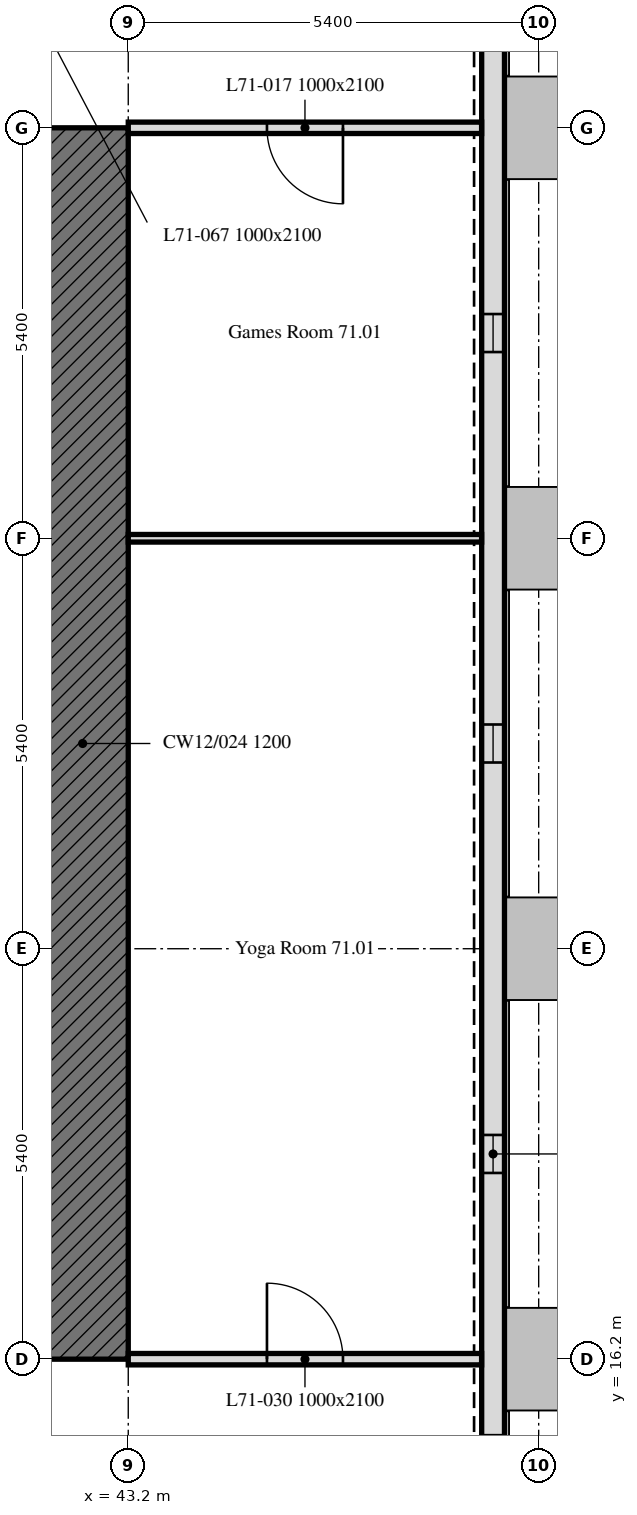
"""IFC4 building model, lengths in metres.
Left out: names, types, materials, properties, quantities, classifications, styles, units other than length and angle.
Written with IfcOpenShell. Run it as: python <this file> out.ifc"""

import sys

from ifc_helpers import new_model, si_unit, direction, frame, frame_2d, origin, place, context, subcontext, project, spatial, rectangle, extrude, element, fill, save


model = new_model("IFC4")
c1 = context("Model", 3, precision=1e-05, world=origin(), true_north=direction((0.0, 1.0)))
c2 = subcontext(c1, "Body", "Model", "MODEL_VIEW")
j1 = project(units=[si_unit("LENGTHUNIT", "METRE"), si_unit("PLANEANGLEUNIT", "RADIAN")], contexts=[c1])
p1 = place(None, origin())
s1 = spatial("IfcSite", under=j1, at=p1, CompositionType="ELEMENT")
p2 = place(p1, origin())
s2 = spatial("IfcBuilding", under=s1, at=p2, CompositionType="ELEMENT")
p3 = place(p2, frame((0.0, 0.0, 288.4)))
s3 = spatial("IfcBuildingStorey", under=s2, at=p3, CompositionType="ELEMENT", Elevation=288.4)
p4 = place(p3, frame((48.0, 10.986, 0.0), z_axis=(0.0, 0.0, 1.0), x_axis=(0.0, 1.0, 0.0)))
e1 = element("IfcWall", 1, at=p4, inside=s3, PredefinedType="SOLIDWALL", context=c2, shape_type="SweptSolid", body=[
    extrude(rectangle(XDim=32.027, YDim=0.3, at=frame_2d((16.014, 0.0))), origin(), (0.0, 0.0, 1.0), 3.0),
])
p5 = place(p4, frame((1.164, 0.0, 0.9)))
e2 = element("IfcOpeningElement", 2, at=p5, cuts=e1, PredefinedType="OPENING", context=c2, shape_type="SweptSolid", body=[
    extrude(rectangle(XDim=1.1, YDim=1.7, at=frame_2d((0.55, 0.85))), frame((0.0, 0.16, 0.0), z_axis=(0.0, -1.0, 0.0), x_axis=(1.0, 0.0, 0.0)), (0.0, 0.0, 1.0), 0.32),
])
p6 = place(p4, frame((3.114, 0.0, 0.9)))
e3 = element("IfcOpeningElement", 3, at=p6, cuts=e1, PredefinedType="OPENING", context=c2, shape_type="SweptSolid", body=[
    extrude(rectangle(XDim=1.1, YDim=1.7, at=frame_2d((0.55, 0.85))), frame((0.0, 0.16, 0.0), z_axis=(0.0, -1.0, 0.0), x_axis=(1.0, 0.0, 0.0)), (0.0, 0.0, 1.0), 0.32),
])
p7 = place(p4, frame((7.664, 0.0, 0.9)))
e4 = element("IfcOpeningElement", 4, at=p7, cuts=e1, PredefinedType="OPENING", context=c2, shape_type="SweptSolid", body=[
    extrude(rectangle(XDim=0.5, YDim=1.7, at=frame_2d((0.25, 0.85))), frame((0.0, 0.16, 0.0), z_axis=(0.0, -1.0, 0.0), x_axis=(1.0, 0.0, 0.0)), (0.0, 0.0, 1.0), 0.32),
])
p8 = place(p4, frame((13.064, 0.0, 0.9)))
e5 = element("IfcOpeningElement", 5, at=p8, cuts=e1, PredefinedType="OPENING", context=c2, shape_type="SweptSolid", body=[
    extrude(rectangle(XDim=0.5, YDim=1.7, at=frame_2d((0.25, 0.85))), frame((0.0, 0.16, 0.0), z_axis=(0.0, -1.0, 0.0), x_axis=(1.0, 0.0, 0.0)), (0.0, 0.0, 1.0), 0.32),
])
p9 = place(p4, frame((18.464, 0.0, 0.9)))
e6 = element("IfcOpeningElement", 6, at=p9, cuts=e1, PredefinedType="OPENING", context=c2, shape_type="SweptSolid", body=[
    extrude(rectangle(XDim=0.5, YDim=1.7, at=frame_2d((0.25, 0.85))), frame((0.0, 0.16, 0.0), z_axis=(0.0, -1.0, 0.0), x_axis=(1.0, 0.0, 0.0)), (0.0, 0.0, 1.0), 0.32),
])
p10 = place(p4, frame((23.864, 0.0, 0.9)))
e7 = element("IfcOpeningElement", 7, at=p10, cuts=e1, PredefinedType="OPENING", context=c2, shape_type="SweptSolid", body=[
    extrude(rectangle(XDim=0.5, YDim=1.7, at=frame_2d((0.25, 0.85))), frame((0.0, 0.16, 0.0), z_axis=(0.0, -1.0, 0.0), x_axis=(1.0, 0.0, 0.0)), (0.0, 0.0, 1.0), 0.32),
])
p11 = place(p4, frame((28.164, 0.0, 0.9)))
e8 = element("IfcOpeningElement", 8, at=p11, cuts=e1, PredefinedType="OPENING", context=c2, shape_type="SweptSolid", body=[
    extrude(rectangle(XDim=1.1, YDim=1.7, at=frame_2d((0.55, 0.85))), frame((0.0, 0.16, 0.0), z_axis=(0.0, -1.0, 0.0), x_axis=(1.0, 0.0, 0.0)), (0.0, 0.0, 1.0), 0.32),
])
p12 = place(p4, frame((29.589, 0.0, 0.9)))
e9 = element("IfcOpeningElement", 9, at=p12, cuts=e1, PredefinedType="OPENING", context=c2, shape_type="SweptSolid", body=[
    extrude(rectangle(XDim=0.65, YDim=1.7, at=frame_2d((0.325, 0.85))), frame((0.0, 0.16, 0.0), z_axis=(0.0, -1.0, 0.0), x_axis=(1.0, 0.0, 0.0)), (0.0, 0.0, 1.0), 0.32),
])
p13 = place(p3, frame((42.6, 32.4, 0.0), z_axis=(0.0, 0.0, 1.0), x_axis=(0.0, -1.0, 0.0)))
e10 = element("IfcWall", 10, at=p13, inside=s3, PredefinedType="SOLIDWALL", context=c2, shape_type="SweptSolid", body=[
    extrude(rectangle(XDim=16.2, YDim=1.2, at=frame_2d((8.1, 0.0))), origin(), (0.0, 0.0, 1.0), 3.0),
])
p14 = place(p3, frame((43.2, 27.0, 0.0), z_axis=(0.0, 0.0, 1.0), x_axis=(1.0, 0.0, 0.0)))
e11 = element("IfcWall", 11, at=p14, inside=s3, PredefinedType="PARTITIONING", context=c2, shape_type="SweptSolid", body=[
    extrude(rectangle(XDim=4.649, YDim=0.1, at=frame_2d((2.325, 0.0))), origin(), (0.0, 0.0, 1.0), 2.4),
])
p15 = place(p3, frame((47.849, 32.4, 0.0), z_axis=(0.0, 0.0, 1.0), x_axis=(-1.0, 0.0, 0.0)))
e12 = element("IfcWall", 12, at=p15, inside=s3, PredefinedType="PARTITIONING", context=c2, shape_type="SweptSolid", body=[
    extrude(rectangle(XDim=4.649, YDim=0.15, at=frame_2d((2.325, 0.0))), origin(), (0.0, 0.0, 1.0), 2.4),
])
p16 = place(p15, frame((1.824, 0.0, 0.0)))
e13 = element("IfcOpeningElement", 13, at=p16, cuts=e12, PredefinedType="OPENING", context=c2, shape_type="SweptSolid", body=[
    extrude(rectangle(XDim=1.0, YDim=2.1, at=frame_2d((0.5, 1.05))), frame((0.0, 0.075, 0.0), z_axis=(0.0, -1.0, 0.0), x_axis=(1.0, 0.0, 0.0)), (0.0, 0.0, 1.0), 0.15),
])
p17 = place(p3, frame((43.2, 16.2, 0.0), z_axis=(0.0, 0.0, 1.0), x_axis=(1.0, 0.0, 0.0)))
e14 = element("IfcWall", 14, at=p17, inside=s3, PredefinedType="PARTITIONING", context=c2, shape_type="SweptSolid", body=[
    extrude(rectangle(XDim=4.649, YDim=0.15, at=frame_2d((2.325, 0.0))), origin(), (0.0, 0.0, 1.0), 2.4),
])
p18 = place(p17, frame((1.825, 0.0, 0.0)))
e15 = element("IfcOpeningElement", 15, at=p18, cuts=e14, PredefinedType="OPENING", context=c2, shape_type="SweptSolid", body=[
    extrude(rectangle(XDim=1.0, YDim=2.1, at=frame_2d((0.5, 1.05))), frame((0.0, 0.075, 0.0), z_axis=(0.0, -1.0, 0.0), x_axis=(1.0, 0.0, 0.0)), (0.0, 0.0, 1.0), 0.15),
])
p19 = place(p7, origin())
e16 = element("IfcWindow", 16, at=p19, inside=s3, PartitioningType="SINGLE_PANEL", PredefinedType="WINDOW", context=c2, shape_type="SweptSolid", body=[
    extrude(rectangle(XDim=0.5, YDim=1.7, at=frame_2d((0.25, 0.85))), frame((0.0, 0.03, 0.0), z_axis=(0.0, -1.0, 0.0), x_axis=(1.0, 0.0, 0.0)), (0.0, 0.0, 1.0), 0.06),
])
fill(e4, e16)
p20 = place(p8, origin())
e17 = element("IfcWindow", 17, at=p20, inside=s3, PartitioningType="SINGLE_PANEL", PredefinedType="WINDOW", context=c2, shape_type="SweptSolid", body=[
    extrude(rectangle(XDim=0.5, YDim=1.7, at=frame_2d((0.25, 0.85))), frame((0.0, 0.03, 0.0), z_axis=(0.0, -1.0, 0.0), x_axis=(1.0, 0.0, 0.0)), (0.0, 0.0, 1.0), 0.06),
])
fill(e5, e17)
p21 = place(p9, origin())
e18 = element("IfcWindow", 18, at=p21, inside=s3, PartitioningType="SINGLE_PANEL", PredefinedType="WINDOW", context=c2, shape_type="SweptSolid", body=[
    extrude(rectangle(XDim=0.5, YDim=1.7, at=frame_2d((0.25, 0.85))), frame((0.0, 0.03, 0.0), z_axis=(0.0, -1.0, 0.0), x_axis=(1.0, 0.0, 0.0)), (0.0, 0.0, 1.0), 0.06),
])
fill(e6, e18)
p22 = place(p16, origin())
e19 = element("IfcDoor", 19, at=p22, inside=s3, OperationType="SINGLE_SWING_LEFT", PredefinedType="DOOR", context=c2, shape_type="SweptSolid", body=[
    extrude(rectangle(XDim=1.0, YDim=2.1, at=frame_2d((0.5, 1.05))), frame((0.0, 0.025, 0.0), z_axis=(0.0, -1.0, 0.0), x_axis=(1.0, 0.0, 0.0)), (0.0, 0.0, 1.0), 0.05),
])
fill(e13, e19)
p23 = place(p18, origin())
e20 = element("IfcDoor", 20, at=p23, inside=s3, OperationType="SINGLE_SWING_LEFT", PredefinedType="DOOR", context=c2, shape_type="SweptSolid", body=[
    extrude(rectangle(XDim=1.0, YDim=2.1, at=frame_2d((0.5, 1.05))), frame((0.0, 0.025, 0.0), z_axis=(0.0, -1.0, 0.0), x_axis=(1.0, 0.0, 0.0)), (0.0, 0.0, 1.0), 0.05),
])
fill(e15, e20)
save(model, sys.argv[1])
